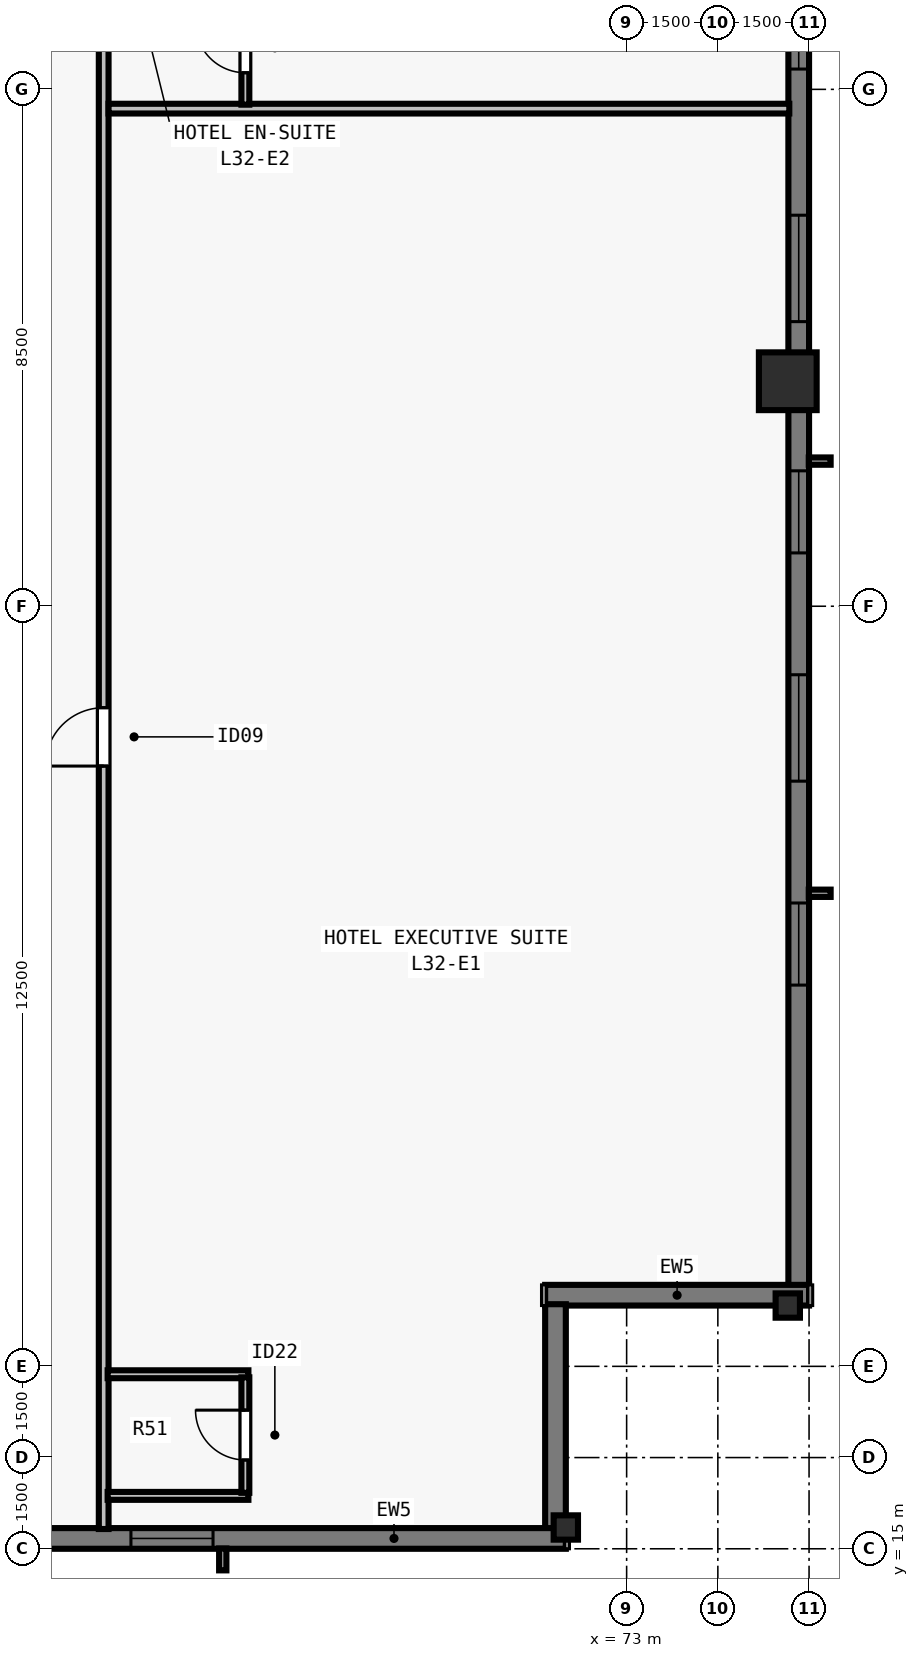
"""IFC4 building model, lengths in metres.
Left out: names, types, materials, properties, quantities, classifications, styles, units other than length and angle.
Written with IfcOpenShell. Run it as: python <this file> out.ifc"""

import sys

from ifc_helpers import new_model, si_unit, direction, frame, frame_2d, origin, origin_2d, place, context, subcontext, project, spatial, rectangle, i_section, extrude, element, fill, save


model = new_model("IFC4")
c1 = context("Model", 3, precision=1e-05, world=origin(), true_north=direction((0.0, 1.0)))
c2 = subcontext(c1, "Body", "Model", "MODEL_VIEW")
j1 = project(units=[si_unit("LENGTHUNIT", "METRE"), si_unit("PLANEANGLEUNIT", "RADIAN")], contexts=[c1])
p1 = place(None, origin())
s1 = spatial("IfcSite", under=j1, at=p1, CompositionType="ELEMENT")
p2 = place(p1, origin())
s2 = spatial("IfcBuilding", under=s1, at=p2, CompositionType="ELEMENT")
p3 = place(p2, frame((0.0, 0.0, 120.0)))
s3 = spatial("IfcBuildingStorey", under=s2, at=p3, CompositionType="ELEMENT", Elevation=120.0)
for number, where, z_axis, x_axis in (
    (1, (72.0, 15.35, 0.0), (0.0, 0.0, 1.0), (1.0, 0.0, 0.0)),
    (2, (75.65, 19.0, 0.0), (0.0, 0.0, 1.0), (0.0, 1.0, 0.0)),
):
    element("IfcColumn", number, at=place(p3, frame(where, z_axis=z_axis, x_axis=x_axis)), inside=s3, PredefinedType="COLUMN", context=c2, shape_type="SweptSolid", body=[
        extrude(i_section(OverallWidth=0.4, OverallDepth=0.4, WebThickness=0.022, FlangeThickness=0.036, at=origin_2d()), origin(), (0.0, 0.0, 1.0), 3.5),
    ])
p4 = place(p3, frame((75.65, 34.2, 0.0), z_axis=(0.0, 0.0, 1.0), x_axis=(0.0, 1.0, 0.0)))
e3 = element("IfcColumn", 3, at=p4, inside=s3, PredefinedType="COLUMN", context=c2, shape_type="SweptSolid", body=[
    extrude(rectangle(XDim=0.95, YDim=0.95, at=origin_2d()), origin(), (0.0, 0.0, 1.0), 3.5),
])
p5 = place(p3, frame((75.83, 59.0, 0.0), z_axis=(0.0, 0.0, 1.0), x_axis=(0.0, -1.0, 0.0)))
e4 = element("IfcWall", 4, at=p5, inside=s3, PredefinedType="SOLIDWALL", context=c2, shape_type="SweptSolid", body=[
    extrude(rectangle(XDim=39.682, YDim=0.34, at=frame_2d((19.841, 0.0))), origin(), (0.0, 0.0, 1.0), 3.28),
])
p6 = place(p5, frame((4.952, 0.0, 0.8)))
e5 = element("IfcOpeningElement", 5, at=p6, cuts=e4, PredefinedType="OPENING", context=c2, shape_type="SweptSolid", body=[
    extrude(rectangle(XDim=1.35, YDim=1.66, at=frame_2d((0.675, 0.83))), frame((0.0, 0.18, 0.0), z_axis=(0.0, -1.0, 0.0), x_axis=(1.0, 0.0, 0.0)), (0.0, 0.0, 1.0), 0.36),
])
p7 = place(p5, frame((8.305, 0.0, 0.8)))
e6 = element("IfcOpeningElement", 6, at=p7, cuts=e4, PredefinedType="OPENING", context=c2, shape_type="SweptSolid", body=[
    extrude(rectangle(XDim=1.75, YDim=1.66, at=frame_2d((0.875, 0.83))), frame((0.0, 0.18, 0.0), z_axis=(0.0, -1.0, 0.0), x_axis=(1.0, 0.0, 0.0)), (0.0, 0.0, 1.0), 0.36),
])
p8 = place(p5, frame((12.059, 0.0, 0.8)))
e7 = element("IfcOpeningElement", 7, at=p8, cuts=e4, PredefinedType="OPENING", context=c2, shape_type="SweptSolid", body=[
    extrude(rectangle(XDim=1.35, YDim=1.66, at=frame_2d((0.675, 0.83))), frame((0.0, 0.18, 0.0), z_axis=(0.0, -1.0, 0.0), x_axis=(1.0, 0.0, 0.0)), (0.0, 0.0, 1.0), 0.36),
])
p9 = place(p5, frame((16.262, 0.0, 0.8)))
e8 = element("IfcOpeningElement", 8, at=p9, cuts=e4, PredefinedType="OPENING", context=c2, shape_type="SweptSolid", body=[
    extrude(rectangle(XDim=1.75, YDim=1.66, at=frame_2d((0.875, 0.83))), frame((0.0, 0.18, 0.0), z_axis=(0.0, -1.0, 0.0), x_axis=(1.0, 0.0, 0.0)), (0.0, 0.0, 1.0), 0.36),
])
p10 = place(p5, frame((18.316, 0.0, 0.8)))
e9 = element("IfcOpeningElement", 9, at=p10, cuts=e4, PredefinedType="OPENING", context=c2, shape_type="SweptSolid", body=[
    extrude(rectangle(XDim=1.35, YDim=1.66, at=frame_2d((0.675, 0.83))), frame((0.0, 0.18, 0.0), z_axis=(0.0, -1.0, 0.0), x_axis=(1.0, 0.0, 0.0)), (0.0, 0.0, 1.0), 0.36),
])
p11 = place(p5, frame((22.07, 0.0, 0.8)))
e10 = element("IfcOpeningElement", 10, at=p11, cuts=e4, PredefinedType="OPENING", context=c2, shape_type="SweptSolid", body=[
    extrude(rectangle(XDim=1.75, YDim=1.66, at=frame_2d((0.875, 0.83))), frame((0.0, 0.18, 0.0), z_axis=(0.0, -1.0, 0.0), x_axis=(1.0, 0.0, 0.0)), (0.0, 0.0, 1.0), 0.36),
])
p12 = place(p5, frame((26.273, 0.0, 0.8)))
e11 = element("IfcOpeningElement", 11, at=p12, cuts=e4, PredefinedType="OPENING", context=c2, shape_type="SweptSolid", body=[
    extrude(rectangle(XDim=1.35, YDim=1.66, at=frame_2d((0.675, 0.83))), frame((0.0, 0.18, 0.0), z_axis=(0.0, -1.0, 0.0), x_axis=(1.0, 0.0, 0.0)), (0.0, 0.0, 1.0), 0.36),
])
p13 = place(p5, frame((29.627, 0.0, 0.8)))
e12 = element("IfcOpeningElement", 12, at=p13, cuts=e4, PredefinedType="OPENING", context=c2, shape_type="SweptSolid", body=[
    extrude(rectangle(XDim=1.75, YDim=1.66, at=frame_2d((0.875, 0.83))), frame((0.0, 0.18, 0.0), z_axis=(0.0, -1.0, 0.0), x_axis=(1.0, 0.0, 0.0)), (0.0, 0.0, 1.0), 0.36),
])
p14 = place(p5, frame((33.38, 0.0, 0.8)))
e13 = element("IfcOpeningElement", 13, at=p14, cuts=e4, PredefinedType="OPENING", context=c2, shape_type="SweptSolid", body=[
    extrude(rectangle(XDim=1.35, YDim=1.66, at=frame_2d((0.675, 0.83))), frame((0.0, 0.18, 0.0), z_axis=(0.0, -1.0, 0.0), x_axis=(1.0, 0.0, 0.0)), (0.0, 0.0, 1.0), 0.36),
])
p15 = place(p3, frame((76.0, 19.17, 0.0), z_axis=(0.0, 0.0, 1.0), x_axis=(-1.0, 0.0, 0.0)))
e14 = element("IfcWall", 14, at=p15, inside=s3, PredefinedType="SOLIDWALL", context=c2, shape_type="SweptSolid", body=[
    extrude(rectangle(XDim=4.34, YDim=0.34, at=frame_2d((2.17, 0.0))), origin(), (0.0, 0.0, 1.0), 3.28),
])
p16 = place(p3, frame((71.83, 19.022, 0.0), z_axis=(0.0, 0.0, 1.0), x_axis=(0.0, -1.0, 0.0)))
e15 = element("IfcWall", 15, at=p16, inside=s3, PredefinedType="SOLIDWALL", context=c2, shape_type="SweptSolid", body=[
    extrude(rectangle(XDim=3.704, YDim=0.34, at=frame_2d((1.852, 0.0))), origin(), (0.0, 0.0, 1.0), 3.28),
])
p17 = place(p3, frame((72.0, 15.17, 0.0), z_axis=(0.0, 0.0, 1.0), x_axis=(-1.0, 0.0, 0.0)))
e16 = element("IfcWall", 16, at=p17, inside=s3, PredefinedType="SOLIDWALL", context=c2, shape_type="SweptSolid", body=[
    extrude(rectangle(XDim=39.682, YDim=0.34, at=frame_2d((19.841, 0.0))), origin(), (0.0, 0.0, 1.0), 3.28),
])
p18 = place(p17, frame((5.802, 0.0, 0.8)))
e17 = element("IfcOpeningElement", 17, at=p18, cuts=e16, PredefinedType="OPENING", context=c2, shape_type="SweptSolid", body=[
    extrude(rectangle(XDim=1.35, YDim=1.66, at=frame_2d((0.675, 0.83))), frame((0.0, 0.18, 0.0), z_axis=(0.0, -1.0, 0.0), x_axis=(1.0, 0.0, 0.0)), (0.0, 0.0, 1.0), 0.36),
])
p19 = place(p17, frame((12.059, 0.0, 0.8)))
e18 = element("IfcOpeningElement", 18, at=p19, cuts=e16, PredefinedType="OPENING", context=c2, shape_type="SweptSolid", body=[
    extrude(rectangle(XDim=1.35, YDim=1.66, at=frame_2d((0.675, 0.83))), frame((0.0, 0.18, 0.0), z_axis=(0.0, -1.0, 0.0), x_axis=(1.0, 0.0, 0.0)), (0.0, 0.0, 1.0), 0.36),
])
p20 = place(p17, frame((19.166, 0.0, 0.8)))
e19 = element("IfcOpeningElement", 19, at=p20, cuts=e16, PredefinedType="OPENING", context=c2, shape_type="SweptSolid", body=[
    extrude(rectangle(XDim=1.35, YDim=1.66, at=frame_2d((0.675, 0.83))), frame((0.0, 0.18, 0.0), z_axis=(0.0, -1.0, 0.0), x_axis=(1.0, 0.0, 0.0)), (0.0, 0.0, 1.0), 0.36),
])
p21 = place(p17, frame((21.27, 0.0, 0.8)))
e20 = element("IfcOpeningElement", 20, at=p21, cuts=e16, PredefinedType="OPENING", context=c2, shape_type="SweptSolid", body=[
    extrude(rectangle(XDim=1.75, YDim=1.66, at=frame_2d((0.875, 0.83))), frame((0.0, 0.18, 0.0), z_axis=(0.0, -1.0, 0.0), x_axis=(1.0, 0.0, 0.0)), (0.0, 0.0, 1.0), 0.36),
])
p22 = place(p17, frame((27.523, 0.0, 0.8)))
e21 = element("IfcOpeningElement", 21, at=p22, cuts=e16, PredefinedType="OPENING", context=c2, shape_type="SweptSolid", body=[
    extrude(rectangle(XDim=1.35, YDim=1.66, at=frame_2d((0.675, 0.83))), frame((0.0, 0.18, 0.0), z_axis=(0.0, -1.0, 0.0), x_axis=(1.0, 0.0, 0.0)), (0.0, 0.0, 1.0), 0.36),
])
p23 = place(p17, frame((29.627, 0.0, 0.8)))
e22 = element("IfcOpeningElement", 22, at=p23, cuts=e16, PredefinedType="OPENING", context=c2, shape_type="SweptSolid", body=[
    extrude(rectangle(XDim=1.75, YDim=1.66, at=frame_2d((0.875, 0.83))), frame((0.0, 0.18, 0.0), z_axis=(0.0, -1.0, 0.0), x_axis=(1.0, 0.0, 0.0)), (0.0, 0.0, 1.0), 0.36),
])
p24 = place(p17, frame((25.43, 0.0, 0.8)))
e23 = element("IfcOpeningElement", 23, at=p24, cuts=e16, PredefinedType="OPENING", context=c2, shape_type="SweptSolid", body=[
    extrude(rectangle(XDim=0.9, YDim=1.66, at=frame_2d((0.45, 0.83))), frame((0.0, 0.18, 0.0), z_axis=(0.0, -1.0, 0.0), x_axis=(1.0, 0.0, 0.0)), (0.0, 0.0, 1.0), 0.36),
])
p25 = place(p17, frame((15.83, 0.0, 0.8)))
e24 = element("IfcOpeningElement", 24, at=p25, cuts=e16, PredefinedType="OPENING", context=c2, shape_type="SweptSolid", body=[
    extrude(rectangle(XDim=0.9, YDim=1.66, at=frame_2d((0.45, 0.83))), frame((0.0, 0.18, 0.0), z_axis=(0.0, -1.0, 0.0), x_axis=(1.0, 0.0, 0.0)), (0.0, 0.0, 1.0), 0.36),
])
p26 = place(p17, frame((34.39, 0.0, 0.8)))
e25 = element("IfcOpeningElement", 25, at=p26, cuts=e16, PredefinedType="OPENING", context=c2, shape_type="SweptSolid", body=[
    extrude(rectangle(XDim=0.9, YDim=1.66, at=frame_2d((0.45, 0.83))), frame((0.0, 0.18, 0.0), z_axis=(0.0, -1.0, 0.0), x_axis=(1.0, 0.0, 0.0)), (0.0, 0.0, 1.0), 0.36),
])
p27 = place(p3, frame((64.4, 15.325, 0.0), z_axis=(0.0, 0.0, 1.0), x_axis=(0.0, 1.0, 0.0)))
e26 = element("IfcWall", 26, at=p27, inside=s3, PredefinedType="PARTITIONING", context=c2, shape_type="SweptSolid", body=[
    extrude(rectangle(XDim=47.35, YDim=0.16, at=frame_2d((23.675, 0.0))), origin(), (0.0, 0.0, 1.0), 2.555),
])
p28 = place(p27, frame((12.547, 0.0, 0.0)))
e27 = element("IfcOpeningElement", 27, at=p28, cuts=e26, PredefinedType="OPENING", context=c2, shape_type="SweptSolid", body=[
    extrude(rectangle(XDim=0.96, YDim=2.15, at=frame_2d((0.48, 1.075))), frame((0.0, 0.09, 0.0), z_axis=(0.0, -1.0, 0.0), x_axis=(1.0, 0.0, 0.0)), (0.0, 0.0, 1.0), 0.18),
])
p29 = place(p27, frame((35.902, 0.0, 0.0)))
e28 = element("IfcOpeningElement", 28, at=p29, cuts=e26, PredefinedType="OPENING", context=c2, shape_type="SweptSolid", body=[
    extrude(rectangle(XDim=0.96, YDim=2.15, at=frame_2d((0.48, 1.075))), frame((0.0, 0.09, 0.0), z_axis=(0.0, -1.0, 0.0), x_axis=(1.0, 0.0, 0.0)), (0.0, 0.0, 1.0), 0.18),
])
for number, where, z_axis, x_axis in (
    (29, (64.465, 15.87, 0.0), (0.0, 0.0, 1.0), (1.0, 0.0, 0.0)),
    (30, (64.465, 17.87, 0.0), (0.0, 0.0, 1.0), (1.0, 0.0, 0.0)),
):
    element("IfcWall", number, at=place(p3, frame(where, z_axis=z_axis, x_axis=x_axis)), inside=s3, PredefinedType="PLUMBINGWALL", context=c2, shape_type="SweptSolid", body=[
        extrude(rectangle(XDim=2.315, YDim=0.13, at=frame_2d((1.157, 0.0))), origin(), (0.0, 0.0, 1.0), 3.28),
    ])
p30 = place(p3, frame((66.73, 15.92, 0.0), z_axis=(0.0, 0.0, 1.0), x_axis=(0.0, 1.0, 0.0)))
e31 = element("IfcWall", 31, at=p30, inside=s3, PredefinedType="PLUMBINGWALL", context=c2, shape_type="SweptSolid", body=[
    extrude(rectangle(XDim=1.9, YDim=0.13, at=frame_2d((0.95, 0.0))), origin(), (0.0, 0.0, 1.0), 3.28),
])
p31 = place(p30, frame((0.54, 0.0, 0.0)))
e32 = element("IfcOpeningElement", 32, at=p31, cuts=e31, PredefinedType="OPENING", context=c2, shape_type="SweptSolid", body=[
    extrude(rectangle(XDim=0.82, YDim=2.1, at=frame_2d((0.41, 1.05))), frame((0.0, 0.075, 0.0), z_axis=(0.0, -1.0, 0.0), x_axis=(1.0, 0.0, 0.0)), (0.0, 0.0, 1.0), 0.15),
])
p32 = place(p3, frame((64.48, 38.683, 0.0), z_axis=(0.0, 0.0, 1.0), x_axis=(1.0, 0.0, 0.0)))
e33 = element("IfcWall", 33, at=p32, inside=s3, PredefinedType="PARTITIONING", context=c2, shape_type="SweptSolid", body=[
    extrude(rectangle(XDim=11.195, YDim=0.16, at=frame_2d((5.598, 0.0))), origin(), (0.0, 0.0, 1.0), 3.28),
])
p33 = place(p3, frame((66.73, 38.748, 0.0), z_axis=(0.0, 0.0, 1.0), x_axis=(0.0, 1.0, 0.0)))
e34 = element("IfcWall", 34, at=p33, inside=s3, PredefinedType="PLUMBINGWALL", context=c2, shape_type="SweptSolid", body=[
    extrude(rectangle(XDim=1.885, YDim=0.13, at=frame_2d((0.942, 0.0))), origin(), (0.0, 0.0, 1.0), 3.28),
])
p34 = place(p33, frame((0.525, 0.0, 0.0)))
e35 = element("IfcOpeningElement", 35, at=p34, cuts=e34, PredefinedType="OPENING", context=c2, shape_type="SweptSolid", body=[
    extrude(rectangle(XDim=0.82, YDim=2.1, at=frame_2d((0.41, 1.05))), frame((0.0, 0.075, 0.0), z_axis=(0.0, -1.0, 0.0), x_axis=(1.0, 0.0, 0.0)), (0.0, 0.0, 1.0), 0.15),
])
p35 = place(p10, origin())
e36 = element("IfcWindow", 36, at=p35, inside=s3, PartitioningType="SINGLE_PANEL", PredefinedType="WINDOW", context=c2, shape_type="SweptSolid", body=[
    extrude(rectangle(XDim=1.35, YDim=1.66, at=frame_2d((0.675, 0.83))), frame((0.0, -0.05, 0.0), z_axis=(0.0, -1.0, 0.0), x_axis=(1.0, 0.0, 0.0)), (0.0, 0.0, 1.0), 0.06),
])
fill(e9, e36)
p36 = place(p11, origin())
e37 = element("IfcWindow", 37, at=p36, inside=s3, PartitioningType="SINGLE_PANEL", PredefinedType="WINDOW", context=c2, shape_type="SweptSolid", body=[
    extrude(rectangle(XDim=1.75, YDim=1.66, at=frame_2d((0.875, 0.83))), frame((0.0, -0.05, 0.0), z_axis=(0.0, -1.0, 0.0), x_axis=(1.0, 0.0, 0.0)), (0.0, 0.0, 1.0), 0.06),
])
fill(e10, e37)
p37 = place(p12, origin())
e38 = element("IfcWindow", 38, at=p37, inside=s3, PartitioningType="SINGLE_PANEL", PredefinedType="WINDOW", context=c2, shape_type="SweptSolid", body=[
    extrude(rectangle(XDim=1.35, YDim=1.66, at=frame_2d((0.675, 0.83))), frame((0.0, -0.05, 0.0), z_axis=(0.0, -1.0, 0.0), x_axis=(1.0, 0.0, 0.0)), (0.0, 0.0, 1.0), 0.06),
])
fill(e11, e38)
p38 = place(p13, origin())
e39 = element("IfcWindow", 39, at=p38, inside=s3, PartitioningType="SINGLE_PANEL", PredefinedType="WINDOW", context=c2, shape_type="SweptSolid", body=[
    extrude(rectangle(XDim=1.75, YDim=1.66, at=frame_2d((0.875, 0.83))), frame((0.0, -0.05, 0.0), z_axis=(0.0, -1.0, 0.0), x_axis=(1.0, 0.0, 0.0)), (0.0, 0.0, 1.0), 0.06),
])
fill(e12, e39)
p39 = place(p14, origin())
e40 = element("IfcWindow", 40, at=p39, inside=s3, PartitioningType="SINGLE_PANEL", PredefinedType="WINDOW", context=c2, shape_type="SweptSolid", body=[
    extrude(rectangle(XDim=1.35, YDim=1.66, at=frame_2d((0.675, 0.83))), frame((0.0, -0.05, 0.0), z_axis=(0.0, -1.0, 0.0), x_axis=(1.0, 0.0, 0.0)), (0.0, 0.0, 1.0), 0.06),
])
fill(e13, e40)
p40 = place(p18, origin())
e41 = element("IfcWindow", 41, at=p40, inside=s3, PartitioningType="SINGLE_PANEL", PredefinedType="WINDOW", context=c2, shape_type="SweptSolid", body=[
    extrude(rectangle(XDim=1.35, YDim=1.66, at=frame_2d((0.675, 0.83))), frame((0.0, -0.05, 0.0), z_axis=(0.0, -1.0, 0.0), x_axis=(1.0, 0.0, 0.0)), (0.0, 0.0, 1.0), 0.06),
])
fill(e17, e41)
p41 = place(p31, origin())
e42 = element("IfcDoor", 42, at=p41, inside=s3, OperationType="SINGLE_SWING_RIGHT", PredefinedType="DOOR", context=c2, shape_type="SweptSolid", body=[
    extrude(rectangle(XDim=0.82, YDim=2.1, at=frame_2d((0.41, 1.05))), frame((0.0, 0.025, 0.0), z_axis=(0.0, -1.0, 0.0), x_axis=(1.0, 0.0, 0.0)), (0.0, 0.0, 1.0), 0.05),
])
fill(e32, e42)
p42 = place(p28, origin())
e43 = element("IfcDoor", 43, at=p42, inside=s3, OperationType="SINGLE_SWING_LEFT", PredefinedType="DOOR", context=c2, shape_type="SweptSolid", body=[
    extrude(rectangle(XDim=0.96, YDim=2.15, at=frame_2d((0.48, 1.075))), frame((0.0, 0.025, 0.0), z_axis=(0.0, -1.0, 0.0), x_axis=(1.0, 0.0, 0.0)), (0.0, 0.0, 1.0), 0.05),
])
fill(e27, e43)
p43 = place(p34, origin())
e44 = element("IfcDoor", 44, at=p43, inside=s3, OperationType="SINGLE_SWING_RIGHT", PredefinedType="DOOR", context=c2, shape_type="SweptSolid", body=[
    extrude(rectangle(XDim=0.82, YDim=2.1, at=frame_2d((0.41, 1.05))), frame((0.0, 0.025, 0.0), z_axis=(0.0, -1.0, 0.0), x_axis=(1.0, 0.0, 0.0)), (0.0, 0.0, 1.0), 0.05),
])
fill(e35, e44)
save(model, sys.argv[1])
